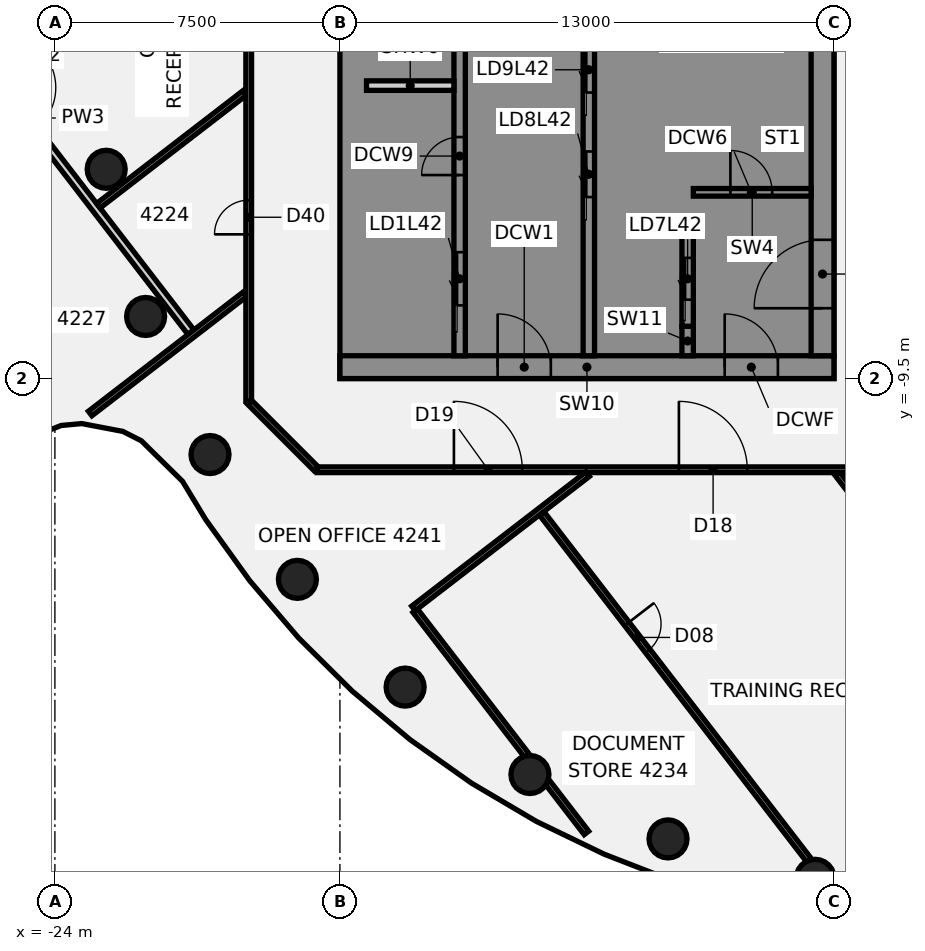
"""IFC4 building model, lengths in metres.
Left out: names, types, materials, properties, quantities, classifications, styles, units other than length and angle.
Written with IfcOpenShell. Run it as: python <this file> out.ifc"""

import sys

from ifc_helpers import new_model, si_unit, direction, frame, frame_2d, origin, origin_2d, place, context, subcontext, project, spatial, polyline, rectangle, circle, outline, extrude, element, fill, save


model = new_model("IFC4")
c1 = context("Model", 3, precision=1e-05, world=origin(), true_north=direction((0.0, 1.0)))
c2 = subcontext(c1, "Body", "Model", "MODEL_VIEW")
j1 = project(units=[si_unit("LENGTHUNIT", "METRE"), si_unit("PLANEANGLEUNIT", "RADIAN")], contexts=[c1])
p1 = place(None, origin())
s1 = spatial("IfcSite", under=j1, at=p1, CompositionType="ELEMENT")
p2 = place(p1, origin())
s2 = spatial("IfcBuilding", under=s1, at=p2, CompositionType="ELEMENT")
p3 = place(p2, frame((0.0, 0.0, 170.5)))
s3 = spatial("IfcBuildingStorey", under=s2, at=p3, CompositionType="ELEMENT", Elevation=170.5)
for number, where, z_axis, x_axis in (
    (1, (-22.651, -3.994, -0.14), (0.0, 0.0, 1.0), (1.0, 0.0, 0.0)),
    (2, (-21.613, -7.866, -0.14), (0.0, 0.0, 1.0), (1.0, 0.0, 0.0)),
    (3, (-19.919, -11.5, -0.14), (0.0, 0.0, 1.0), (1.0, 0.0, 0.0)),
    (4, (-17.619, -14.784, -0.14), (0.0, 0.0, 1.0), (1.0, 0.0, 0.0)),
    (5, (-14.784, -17.619, -0.14), (0.0, 0.0, 1.0), (1.0, 0.0, 0.0)),
    (6, (-11.5, -19.919, -0.14), (0.0, 0.0, 1.0), (1.0, 0.0, 0.0)),
    (7, (-7.866, -21.613, -0.14), (0.0, 0.0, 1.0), (1.0, 0.0, 0.0)),
    (8, (-3.994, -22.651, -0.14), (0.0, 0.0, 1.0), (1.0, 0.0, 0.0)),
):
    element("IfcColumn", number, at=place(p3, frame(where, z_axis=z_axis, x_axis=x_axis)), inside=s3, PredefinedType="COLUMN", context=c2, shape_type="SweptSolid", body=[
        extrude(circle(Radius=0.5, at=origin_2d()), origin(), (0.0, 0.0, 1.0), 3.75),
    ])
p4 = place(p3, frame((-29.099, 2.988, 0.0), z_axis=(0.0, 0.0, 1.0), x_axis=(0.610216796322, -0.792234473806, 0.0)))
e9 = element("IfcWall", 9, at=p4, inside=s3, PredefinedType="PARTITIONING", context=c2, shape_type="SweptSolid", body=[
    extrude(rectangle(XDim=14.219, YDim=0.2, at=frame_2d((7.11, 0.0))), origin(), (0.0, 0.0, 1.0), 3.01),
])
p5 = place(p4, frame((6.099, 0.0, 0.0)))
e10 = element("IfcOpeningElement", 10, at=p5, cuts=e9, PredefinedType="OPENING", context=c2, shape_type="SweptSolid", body=[
    extrude(rectangle(XDim=1.4, YDim=2.1, at=frame_2d((0.7, 1.05))), frame((0.0, 0.11, 0.0), z_axis=(0.0, -1.0, 0.0), x_axis=(1.0, 0.0, 0.0)), (0.0, 0.0, 1.0), 0.22),
])
p6 = place(p3, frame((-14.519, -15.607, 0.0), z_axis=(0.0, 0.0, 1.0), x_axis=(0.610346471548, -0.792134574848, 0.0)))
e11 = element("IfcWall", 11, at=p6, inside=s3, PredefinedType="PARTITIONING", context=c2, shape_type="SweptSolid", body=[
    extrude(rectangle(XDim=4.824, YDim=0.15, at=frame_2d((2.412, 0.0))), origin(), (0.0, 0.0, 1.0), 3.01),
])
p7 = place(p3, frame((-11.044, -20.118, 0.0), z_axis=(0.0, 0.0, 1.0), x_axis=(0.610360453682, -0.792123801297, 0.0)))
e12 = element("IfcWall", 12, at=p7, inside=s3, PredefinedType="PARTITIONING", context=c2, shape_type="SweptSolid", body=[
    extrude(rectangle(XDim=1.688, YDim=0.15, at=frame_2d((0.844, 0.0))), origin(), (0.0, 0.0, 1.0), 3.01),
])
p8 = place(p3, frame((-11.189, -13.048, 0.0), z_axis=(0.0, 0.0, 1.0), x_axis=(0.610349031446, -0.792132602418, 0.0)))
e13 = element("IfcWall", 13, at=p8, inside=s3, PredefinedType="PARTITIONING", context=c2, shape_type="SweptSolid", body=[
    extrude(rectangle(XDim=11.531, YDim=0.15, at=frame_2d((5.766, 0.0))), origin(), (0.0, 0.0, 1.0), 3.01),
])
p9 = place(p8, frame((3.67, 0.0, 0.0)))
e14 = element("IfcOpeningElement", 14, at=p9, cuts=e13, PredefinedType="OPENING", context=c2, shape_type="SweptSolid", body=[
    extrude(rectangle(XDim=0.9, YDim=2.1, at=frame_2d((0.45, 1.05))), frame((0.0, 0.085, 0.0), z_axis=(0.0, -1.0, 0.0), x_axis=(1.0, 0.0, 0.0)), (0.0, 0.0, 1.0), 0.17),
])
p10 = place(p3, frame((-3.411, -12.003, 0.0), z_axis=(0.0, 0.0, 1.0), x_axis=(0.610364170435, -0.792120937388, 0.0)))
e15 = element("IfcWall", 15, at=p10, inside=s3, PredefinedType="PARTITIONING", context=c2, shape_type="SweptSolid", body=[
    extrude(rectangle(XDim=13.701, YDim=0.15, at=frame_2d((6.851, 0.0))), origin(), (0.0, 0.0, 1.0), 3.01),
])
p11 = place(p10, frame((7.67, 0.0, 0.0)))
e16 = element("IfcOpeningElement", 16, at=p11, cuts=e15, PredefinedType="OPENING", context=c2, shape_type="SweptSolid", body=[
    extrude(rectangle(XDim=1.8, YDim=2.1, at=frame_2d((0.9, 1.05))), frame((0.0, 0.085, 0.0), z_axis=(0.0, -1.0, 0.0), x_axis=(1.0, 0.0, 0.0)), (0.0, 0.0, 1.0), 0.17),
])
p12 = place(p3, frame((-18.872, -10.128, 0.0), z_axis=(0.0, 0.0, 1.0), x_axis=(0.707106781187, -0.707106781187, 0.0)))
e17 = element("IfcWall", 17, at=p12, inside=s3, PredefinedType="PARTITIONING", context=c2, shape_type="SweptSolid", body=[
    extrude(rectangle(XDim=2.465, YDim=0.15, at=frame_2d((1.232, 0.0))), origin(), (0.0, 0.0, 1.0), 3.01),
])
p13 = place(p3, frame((-17.1, -11.9, 0.0), z_axis=(0.0, 0.0, 1.0), x_axis=(1.0, 0.0, 0.0)))
e18 = element("IfcWall", 18, at=p13, inside=s3, PredefinedType="PARTITIONING", context=c2, shape_type="SweptSolid", body=[
    extrude(rectangle(XDim=34.165, YDim=0.15, at=frame_2d((17.083, 0.0))), origin(), (0.0, 0.0, 1.0), 3.01),
])
p14 = place(p13, frame((9.52, 0.0, 0.0)))
e19 = element("IfcOpeningElement", 19, at=p14, cuts=e18, PredefinedType="OPENING", context=c2, shape_type="SweptSolid", body=[
    extrude(rectangle(XDim=1.8, YDim=2.1, at=frame_2d((0.9, 1.05))), frame((0.0, 0.085, 0.0), z_axis=(0.0, -1.0, 0.0), x_axis=(1.0, 0.0, 0.0)), (0.0, 0.0, 1.0), 0.17),
])
p15 = place(p13, frame((3.6, 0.0, 0.0)))
e20 = element("IfcOpeningElement", 20, at=p15, cuts=e18, PredefinedType="OPENING", context=c2, shape_type="SweptSolid", body=[
    extrude(rectangle(XDim=1.8, YDim=2.1, at=frame_2d((0.9, 1.05))), frame((0.0, 0.085, 0.0), z_axis=(0.0, -1.0, 0.0), x_axis=(1.0, 0.0, 0.0)), (0.0, 0.0, 1.0), 0.17),
])
p16 = place(p13, frame((23.862, 0.0, 0.0)))
e21 = element("IfcOpeningElement", 21, at=p16, cuts=e18, PredefinedType="OPENING", context=c2, shape_type="SweptSolid", body=[
    extrude(rectangle(XDim=1.8, YDim=2.1, at=frame_2d((0.9, 1.05))), frame((0.0, 0.085, 0.0), z_axis=(0.0, -1.0, 0.0), x_axis=(1.0, 0.0, 0.0)), (0.0, 0.0, 1.0), 0.17),
])
p17 = place(p3, frame((-23.072, -10.42, 0.0), z_axis=(0.0, 0.0, 1.0), x_axis=(0.79217677678, 0.610291696102, 0.0)))
e22 = element("IfcWall", 22, at=p17, inside=s3, PredefinedType="PARTITIONING", context=c2, shape_type="SweptSolid", body=[
    extrude(rectangle(XDim=5.137, YDim=0.15, at=frame_2d((2.568, 0.0))), origin(), (0.0, 0.0, 1.0), 3.01),
])
p18 = place(p3, frame((-22.856, -4.952, 0.0), z_axis=(0.0, 0.0, 1.0), x_axis=(0.792144175523, 0.610334011165, 0.0)))
e23 = element("IfcWall", 23, at=p18, inside=s3, PredefinedType="PARTITIONING", context=c2, shape_type="SweptSolid", body=[
    extrude(rectangle(XDim=4.864, YDim=0.15, at=frame_2d((2.432, 0.0))), origin(), (0.0, 0.0, 1.0), 3.01),
])
p19 = place(p3, frame((-14.565, -15.548, 0.0), z_axis=(0.0, 0.0, 1.0), x_axis=(0.792167406266, 0.610303859114, 0.0)))
e24 = element("IfcWall", 24, at=p19, inside=s3, PredefinedType="PARTITIONING", context=c2, shape_type="SweptSolid", body=[
    extrude(rectangle(XDim=5.787, YDim=0.15, at=frame_2d((2.894, 0.0))), origin(), (0.0, 0.0, 1.0), 3.01),
])
p20 = place(p3, frame((-18.9, -10.1, 0.0), z_axis=(0.0, 0.0, 1.0), x_axis=(0.0, 1.0, 0.0)))
e25 = element("IfcWall", 25, at=p20, inside=s3, PredefinedType="PARTITIONING", context=c2, shape_type="SweptSolid", body=[
    extrude(rectangle(XDim=20.2, YDim=0.15, at=frame_2d((10.1, 0.0))), origin(), (0.0, 0.0, 1.0), 3.01),
])
p21 = place(p20, frame((12.546, 0.0, 0.0)))
e26 = element("IfcOpeningElement", 26, at=p21, cuts=e25, PredefinedType="OPENING", context=c2, shape_type="SweptSolid", body=[
    extrude(rectangle(XDim=1.8, YDim=2.1, at=frame_2d((0.9, 1.05))), frame((0.0, 0.085, 0.0), z_axis=(0.0, -1.0, 0.0), x_axis=(1.0, 0.0, 0.0)), (0.0, 0.0, 1.0), 0.17),
])
p22 = place(p20, frame((4.394, 0.0, 0.0)))
e27 = element("IfcOpeningElement", 27, at=p22, cuts=e25, PredefinedType="OPENING", context=c2, shape_type="SweptSolid", body=[
    extrude(rectangle(XDim=0.9, YDim=2.1, at=frame_2d((0.45, 1.05))), frame((0.0, 0.085, 0.0), z_axis=(0.0, -1.0, 0.0), x_axis=(1.0, 0.0, 0.0)), (0.0, 0.0, 1.0), 0.17),
])
p23 = place(p3, frame((-16.5, -9.2, 0.0), z_axis=(0.0, 0.0, 1.0), x_axis=(1.0, 0.0, 0.0)))
e28 = element("IfcWall", 28, at=p23, inside=s3, PredefinedType="SHEAR", context=c2, shape_type="SweptSolid", body=[
    extrude(rectangle(XDim=13.0, YDim=0.6, at=frame_2d((6.5, 0.0))), origin(), (0.0, 0.0, 1.0), 3.61),
])
p24 = place(p23, frame((4.15, 0.0, 0.0)))
e29 = element("IfcOpeningElement", 29, at=p24, cuts=e28, PredefinedType="OPENING", context=c2, shape_type="SweptSolid", body=[
    extrude(rectangle(XDim=1.4, YDim=2.1, at=frame_2d((0.7, 1.05))), frame((0.0, 0.31, 0.0), z_axis=(0.0, -1.0, 0.0), x_axis=(1.0, 0.0, 0.0)), (0.0, 0.0, 1.0), 0.62),
])
p25 = place(p23, frame((10.125, 0.0, 0.0)))
e30 = element("IfcOpeningElement", 30, at=p25, cuts=e28, PredefinedType="OPENING", context=c2, shape_type="SweptSolid", body=[
    extrude(rectangle(XDim=1.4, YDim=2.1, at=frame_2d((0.7, 1.05))), frame((0.0, 0.31, 0.0), z_axis=(0.0, -1.0, 0.0), x_axis=(1.0, 0.0, 0.0)), (0.0, 0.0, 1.0), 0.62),
])
p26 = place(p3, origin())
e31 = element("IfcWall", 31, at=p26, inside=s3, PredefinedType="SHEAR", context=c2, shape_type="SweptSolid", body=[
    extrude(outline(polyline([(-13.5, -8.125), (-15.9, -8.125), (-15.9, -5.625), (-13.5, -5.625), (-13.5, -5.375), (-15.9, -5.375), (-15.9, 5.375), (-13.5, 5.375), (-13.5, 5.625), (-15.9, 5.625), (-15.9, 8.125), (-13.5, 8.125), (-13.5, 8.9), (-15.9, 8.9), (-16.5, 8.9), (-16.5, -8.9), (-15.9, -8.9), (-13.5, -8.9), (-13.5, -8.125)])), origin(), (0.0, 0.0, 1.0), 3.61),
])
p27 = place(p3, origin())
e32 = element("IfcWall", 32, at=p27, inside=s3, PredefinedType="SHEAR", context=c2, shape_type="SweptSolid", body=[
    extrude(outline(polyline([(-9.8, -5.375), (-9.8, -5.625), (-7.5, -5.625), (-7.2, -5.625), (-7.2, 8.9), (-7.5, 8.9), (-9.8, 8.9), (-9.8, 8.125), (-7.5, 8.125), (-7.5, 5.625), (-9.8, 5.625), (-9.8, 5.375), (-7.5, 5.375), (-7.5, 2.875), (-9.8, 2.875), (-9.8, 2.625), (-7.5, 2.625), (-7.5, 0.125), (-9.8, 0.125), (-9.8, -0.125), (-7.5, -0.125), (-7.5, -2.625), (-9.8, -2.625), (-9.8, -2.875), (-7.5, -2.875), (-7.5, -5.375), (-9.8, -5.375)])), origin(), (0.0, 0.0, 1.0), 3.61),
])
p28 = place(p3, origin())
e33 = element("IfcWall", 33, at=p28, inside=s3, PredefinedType="SHEAR", context=c2, shape_type="SweptSolid", body=[
    extrude(outline(polyline([(-7.5, -8.125), (-9.55, -8.125), (-9.55, -5.625), (-9.8, -5.625), (-9.8, -8.125), (-9.8, -8.9), (-7.5, -8.9), (-7.5, -8.125)])), origin(), (0.0, 0.0, 1.0), 3.61),
])
p29 = place(p3, frame((-7.35, -8.9, 0.0), z_axis=(0.0, 0.0, 1.0), x_axis=(0.0, 1.0, 0.0)))
e34 = element("IfcWall", 34, at=p29, inside=s3, PredefinedType="SHEAR", context=c2, shape_type="SweptSolid", body=[
    extrude(rectangle(XDim=0.775, YDim=0.3, at=frame_2d((0.387, 0.0))), origin(), (0.0, 0.0, 1.0), 3.61),
])
p30 = place(p3, frame((-13.35, -8.9, 0.0), z_axis=(0.0, 0.0, 1.0), x_axis=(0.0, 1.0, 0.0)))
e35 = element("IfcWall", 35, at=p30, inside=s3, PredefinedType="SHEAR", context=c2, shape_type="SweptSolid", body=[
    extrude(rectangle(XDim=17.8, YDim=0.3, at=frame_2d((8.9, 0.0))), origin(), (0.0, 0.0, 1.0), 3.61),
])
p31 = place(p30, frame((1.325, 0.0, 0.0)))
e36 = element("IfcOpeningElement", 36, at=p31, cuts=e35, PredefinedType="OPENING", context=c2, shape_type="SweptSolid", body=[
    extrude(rectangle(XDim=1.4, YDim=2.1, at=frame_2d((0.7, 1.05))), frame((0.0, 0.16, 0.0), z_axis=(0.0, -1.0, 0.0), x_axis=(1.0, 0.0, 0.0)), (0.0, 0.0, 1.0), 0.32),
])
p32 = place(p30, frame((4.754, 0.0, 0.0)))
e37 = element("IfcOpeningElement", 37, at=p32, cuts=e35, PredefinedType="OPENING", context=c2, shape_type="SweptSolid", body=[
    extrude(rectangle(XDim=1.0, YDim=2.1, at=frame_2d((0.5, 1.05))), frame((0.0, 0.16, 0.0), z_axis=(0.0, -1.0, 0.0), x_axis=(1.0, 0.0, 0.0)), (0.0, 0.0, 1.0), 0.32),
])
p33 = place(p30, frame((10.254, 0.0, 0.0)))
e38 = element("IfcOpeningElement", 38, at=p33, cuts=e35, PredefinedType="OPENING", context=c2, shape_type="SweptSolid", body=[
    extrude(rectangle(XDim=1.0, YDim=2.1, at=frame_2d((0.5, 1.05))), frame((0.0, 0.16, 0.0), z_axis=(0.0, -1.0, 0.0), x_axis=(1.0, 0.0, 0.0)), (0.0, 0.0, 1.0), 0.32),
])
p34 = place(p3, frame((-9.95, -8.9, 0.0), z_axis=(0.0, 0.0, 1.0), x_axis=(0.0, 1.0, 0.0)))
e39 = element("IfcWall", 39, at=p34, inside=s3, PredefinedType="SHEAR", context=c2, shape_type="SweptSolid", body=[
    extrude(rectangle(XDim=17.8, YDim=0.3, at=frame_2d((8.9, 0.0))), origin(), (0.0, 0.0, 1.0), 3.61),
])
p35 = place(p34, frame((4.175, 0.0, 0.0)))
e40 = element("IfcOpeningElement", 40, at=p35, cuts=e39, PredefinedType="OPENING", context=c2, shape_type="SweptSolid", body=[
    extrude(rectangle(XDim=1.2, YDim=2.1, at=frame_2d((0.6, 1.05))), frame((0.0, 0.16, 0.0), z_axis=(0.0, -1.0, 0.0), x_axis=(1.0, 0.0, 0.0)), (0.0, 0.0, 1.0), 0.32),
])
p36 = place(p34, frame((6.925, 0.0, 0.0)))
e41 = element("IfcOpeningElement", 41, at=p36, cuts=e39, PredefinedType="OPENING", context=c2, shape_type="SweptSolid", body=[
    extrude(rectangle(XDim=1.2, YDim=2.1, at=frame_2d((0.6, 1.05))), frame((0.0, 0.16, 0.0), z_axis=(0.0, -1.0, 0.0), x_axis=(1.0, 0.0, 0.0)), (0.0, 0.0, 1.0), 0.32),
])
p37 = place(p3, frame((-7.35, -8.125, 0.0), z_axis=(0.0, 0.0, 1.0), x_axis=(0.0, 1.0, 0.0)))
e42 = element("IfcWall", 42, at=p37, inside=s3, PredefinedType="SHEAR", context=c2, shape_type="SweptSolid", body=[
    extrude(rectangle(XDim=2.5, YDim=0.3, at=frame_2d((1.25, 0.0))), origin(), (0.0, 0.0, 1.0), 3.61),
])
p38 = place(p37, frame((0.7, 0.0, 0.0)))
e43 = element("IfcOpeningElement", 43, at=p38, cuts=e42, PredefinedType="OPENING", context=c2, shape_type="SweptSolid", body=[
    extrude(rectangle(XDim=1.1, YDim=2.1, at=frame_2d((0.55, 1.05))), frame((0.0, 0.16, 0.0), z_axis=(0.0, -1.0, 0.0), x_axis=(1.0, 0.0, 0.0)), (0.0, 0.0, 1.0), 0.32),
])
p39 = place(p3, frame((-3.8, -8.9, 0.0), z_axis=(0.0, 0.0, 1.0), x_axis=(0.0, 1.0, 0.0)))
e44 = element("IfcWall", 44, at=p39, inside=s3, PredefinedType="SHEAR", context=c2, shape_type="SweptSolid", body=[
    extrude(rectangle(XDim=17.8, YDim=0.6, at=frame_2d((8.9, 0.0))), origin(), (0.0, 0.0, 1.0), 3.61),
])
p40 = place(p39, frame((1.25, 0.0, 0.0)))
e45 = element("IfcOpeningElement", 45, at=p40, cuts=e44, PredefinedType="OPENING", context=c2, shape_type="SweptSolid", body=[
    extrude(rectangle(XDim=1.8, YDim=2.1, at=frame_2d((0.9, 1.05))), frame((0.0, 0.31, 0.0), z_axis=(0.0, -1.0, 0.0), x_axis=(1.0, 0.0, 0.0)), (0.0, 0.0, 1.0), 0.62),
])
p41 = place(p39, frame((13.8, 0.0, 0.0)))
e46 = element("IfcOpeningElement", 46, at=p41, cuts=e44, PredefinedType="OPENING", context=c2, shape_type="SweptSolid", body=[
    extrude(rectangle(XDim=1.0, YDim=2.1, at=frame_2d((0.5, 1.05))), frame((0.0, 0.31, 0.0), z_axis=(0.0, -1.0, 0.0), x_axis=(1.0, 0.0, 0.0)), (0.0, 0.0, 1.0), 0.62),
])
p42 = place(p3, frame((-7.2, -4.6, 0.0), z_axis=(0.0, 0.0, 1.0), x_axis=(1.0, 0.0, 0.0)))
e47 = element("IfcWall", 47, at=p42, inside=s3, PredefinedType="SHEAR", context=c2, shape_type="SweptSolid", body=[
    extrude(rectangle(XDim=3.1, YDim=0.2, at=frame_2d((1.55, 0.0))), origin(), (0.0, 0.0, 1.0), 3.61),
])
p43 = place(p42, frame((0.975, 0.0, 0.0)))
e48 = element("IfcOpeningElement", 48, at=p43, cuts=e47, PredefinedType="OPENING", context=c2, shape_type="SweptSolid", body=[
    extrude(rectangle(XDim=1.1, YDim=2.1, at=frame_2d((0.55, 1.05))), frame((0.0, 0.11, 0.0), z_axis=(0.0, -1.0, 0.0), x_axis=(1.0, 0.0, 0.0)), (0.0, 0.0, 1.0), 0.22),
])
p44 = place(p3, frame((-15.8, -1.792, 0.0), z_axis=(0.0, 0.0, 1.0), x_axis=(1.0, 0.0, 0.0)))
e49 = element("IfcWall", 49, at=p44, inside=s3, PredefinedType="PARTITIONING", context=c2, shape_type="SweptSolid", body=[
    extrude(rectangle(XDim=2.3, YDim=0.25, at=frame_2d((1.15, 0.0))), origin(), (0.0, 0.0, 1.0), 3.61),
])
p45 = place(p9, frame((0.9, 0.0, 0.0), z_axis=(0.0, 0.0, 1.0), x_axis=(-1.0, 0.0, 0.0)))
e50 = element("IfcDoor", 50, at=p45, inside=s3, OperationType="SINGLE_SWING_LEFT", PredefinedType="DOOR", context=c2, shape_type="SweptSolid", body=[
    extrude(rectangle(XDim=0.9, YDim=2.1, at=frame_2d((0.45, 1.05))), frame((0.0, 0.025, 0.0), z_axis=(0.0, -1.0, 0.0), x_axis=(1.0, 0.0, 0.0)), (0.0, 0.0, 1.0), 0.05),
])
fill(e14, e50)
p46 = place(p14, origin())
e51 = element("IfcDoor", 51, at=p46, inside=s3, OperationType="DOUBLE_DOOR_SINGLE_SWING", PredefinedType="DOOR", context=c2, shape_type="SweptSolid", body=[
    extrude(rectangle(XDim=1.8, YDim=2.1, at=frame_2d((0.9, 1.05))), frame((0.0, 0.025, 0.0), z_axis=(0.0, -1.0, 0.0), x_axis=(1.0, 0.0, 0.0)), (0.0, 0.0, 1.0), 0.05),
])
fill(e19, e51)
p47 = place(p15, frame((1.8, 0.0, 0.0), z_axis=(0.0, 0.0, 1.0), x_axis=(-1.0, 0.0, 0.0)))
e52 = element("IfcDoor", 52, at=p47, inside=s3, OperationType="DOUBLE_DOOR_SINGLE_SWING", PredefinedType="DOOR", context=c2, shape_type="SweptSolid", body=[
    extrude(rectangle(XDim=1.8, YDim=2.1, at=frame_2d((0.9, 1.05))), frame((0.0, 0.025, 0.0), z_axis=(0.0, -1.0, 0.0), x_axis=(1.0, 0.0, 0.0)), (0.0, 0.0, 1.0), 0.05),
])
fill(e20, e52)
p48 = place(p22, origin())
e53 = element("IfcDoor", 53, at=p48, inside=s3, OperationType="SINGLE_SWING_RIGHT", PredefinedType="DOOR", context=c2, shape_type="SweptSolid", body=[
    extrude(rectangle(XDim=0.9, YDim=2.1, at=frame_2d((0.45, 1.05))), frame((0.0, 0.025, 0.0), z_axis=(0.0, -1.0, 0.0), x_axis=(1.0, 0.0, 0.0)), (0.0, 0.0, 1.0), 0.05),
])
fill(e27, e53)
p49 = place(p24, origin())
e54 = element("IfcDoor", 54, at=p49, inside=s3, OperationType="SINGLE_SWING_LEFT", PredefinedType="DOOR", context=c2, shape_type="SweptSolid", body=[
    extrude(rectangle(XDim=1.4, YDim=2.1, at=frame_2d((0.7, 1.05))), frame((0.0, 0.025, 0.0), z_axis=(0.0, -1.0, 0.0), x_axis=(1.0, 0.0, 0.0)), (0.0, 0.0, 1.0), 0.05),
])
fill(e29, e54)
p50 = place(p25, origin())
e55 = element("IfcDoor", 55, at=p50, inside=s3, OperationType="SINGLE_SWING_LEFT", PredefinedType="DOOR", context=c2, shape_type="SweptSolid", body=[
    extrude(rectangle(XDim=1.4, YDim=2.1, at=frame_2d((0.7, 1.05))), frame((0.0, 0.025, 0.0), z_axis=(0.0, -1.0, 0.0), x_axis=(1.0, 0.0, 0.0)), (0.0, 0.0, 1.0), 0.05),
])
fill(e30, e55)
p51 = place(p40, origin())
e56 = element("IfcDoor", 56, at=p51, inside=s3, OperationType="SINGLE_SWING_LEFT", PredefinedType="DOOR", context=c2, shape_type="SweptSolid", body=[
    extrude(rectangle(XDim=1.8, YDim=2.1, at=frame_2d((0.9, 1.05))), frame((0.0, 0.025, 0.0), z_axis=(0.0, -1.0, 0.0), x_axis=(1.0, 0.0, 0.0)), (0.0, 0.0, 1.0), 0.05),
])
fill(e45, e56)
p52 = place(p43, origin())
e57 = element("IfcDoor", 57, at=p52, inside=s3, OperationType="SINGLE_SWING_LEFT", PredefinedType="DOOR", context=c2, shape_type="SweptSolid", body=[
    extrude(rectangle(XDim=1.1, YDim=2.1, at=frame_2d((0.55, 1.05))), frame((0.0, 0.025, 0.0), z_axis=(0.0, -1.0, 0.0), x_axis=(1.0, 0.0, 0.0)), (0.0, 0.0, 1.0), 0.05),
])
fill(e48, e57)
p53 = place(p31, origin())
e58 = element("IfcDoor", 58, at=p53, inside=s3, OperationType="SLIDING_TO_LEFT", PredefinedType="DOOR", context=c2, shape_type="SweptSolid", body=[
    extrude(rectangle(XDim=1.4, YDim=2.1, at=frame_2d((0.7, 1.05))), frame((0.0, 0.025, 0.0), z_axis=(0.0, -1.0, 0.0), x_axis=(1.0, 0.0, 0.0)), (0.0, 0.0, 1.0), 0.05),
])
fill(e36, e58)
p54 = place(p38, origin())
e59 = element("IfcDoor", 59, at=p54, inside=s3, OperationType="SLIDING_TO_LEFT", PredefinedType="DOOR", context=c2, shape_type="SweptSolid", body=[
    extrude(rectangle(XDim=1.1, YDim=2.1, at=frame_2d((0.55, 1.05))), frame((0.0, 0.025, 0.0), z_axis=(0.0, -1.0, 0.0), x_axis=(1.0, 0.0, 0.0)), (0.0, 0.0, 1.0), 0.05),
])
fill(e43, e59)
p55 = place(p35, origin())
e60 = element("IfcDoor", 60, at=p55, inside=s3, OperationType="SLIDING_TO_LEFT", PredefinedType="DOOR", context=c2, shape_type="SweptSolid", body=[
    extrude(rectangle(XDim=1.2, YDim=2.1, at=frame_2d((0.6, 1.05))), frame((0.0, 0.025, 0.0), z_axis=(0.0, -1.0, 0.0), x_axis=(1.0, 0.0, 0.0)), (0.0, 0.0, 1.0), 0.05),
])
fill(e40, e60)
p56 = place(p36, origin())
e61 = element("IfcDoor", 61, at=p56, inside=s3, OperationType="SLIDING_TO_LEFT", PredefinedType="DOOR", context=c2, shape_type="SweptSolid", body=[
    extrude(rectangle(XDim=1.2, YDim=2.1, at=frame_2d((0.6, 1.05))), frame((0.0, 0.025, 0.0), z_axis=(0.0, -1.0, 0.0), x_axis=(1.0, 0.0, 0.0)), (0.0, 0.0, 1.0), 0.05),
])
fill(e41, e61)
p57 = place(p32, origin())
e62 = element("IfcDoor", 62, at=p57, inside=s3, OperationType="SINGLE_SWING_LEFT", PredefinedType="DOOR", context=c2, shape_type="SweptSolid", body=[
    extrude(rectangle(XDim=1.0, YDim=2.1, at=frame_2d((0.5, 1.05))), frame((0.0, 0.025, 0.0), z_axis=(0.0, -1.0, 0.0), x_axis=(1.0, 0.0, 0.0)), (0.0, 0.0, 1.0), 0.05),
])
fill(e37, e62)
save(model, sys.argv[1])
